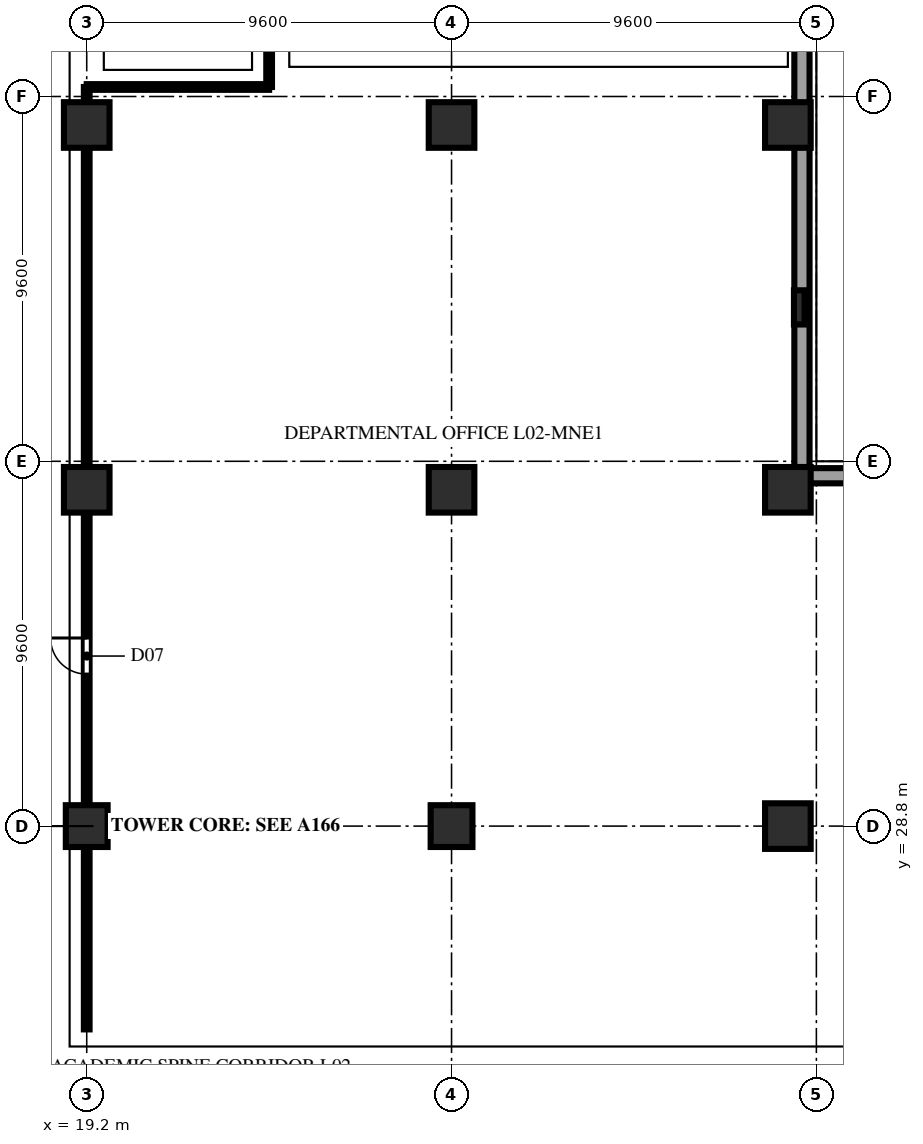
"""IFC4 building model, lengths in metres.
Left out: names, types, materials, properties, quantities, classifications, styles, units other than length and angle.
Written with IfcOpenShell. Run it as: python <this file> out.ifc"""

import sys

from ifc_helpers import new_model, si_unit, direction, frame, frame_2d, origin, origin_2d, place, context, subcontext, project, spatial, rectangle, extrude, element, fill, save


model = new_model("IFC4")
c1 = context("Model", 3, precision=1e-05, world=origin(), true_north=direction((0.0, 1.0)))
c2 = subcontext(c1, "Body", "Model", "MODEL_VIEW")
j1 = project(units=[si_unit("LENGTHUNIT", "METRE"), si_unit("PLANEANGLEUNIT", "RADIAN")], contexts=[c1])
p1 = place(None, origin())
s1 = spatial("IfcSite", under=j1, at=p1, CompositionType="ELEMENT")
p2 = place(p1, origin())
s2 = spatial("IfcBuilding", under=s1, at=p2, CompositionType="ELEMENT")
p3 = place(p2, frame((0.0, 0.0, 10.4)))
s3 = spatial("IfcBuildingStorey", under=s2, at=p3, CompositionType="ELEMENT", Elevation=10.4)
p4 = place(p3, frame((19.2, 28.8, 0.0), z_axis=(0.0, 0.0, 1.0), x_axis=(1.0, 0.0, 0.0)))
e1 = element("IfcColumn", 1, at=p4, inside=s3, PredefinedType="COLUMN", context=c2, shape_type="SweptSolid", body=[
    extrude(rectangle(XDim=1.1, YDim=1.1, at=origin_2d()), origin(), (0.0, 0.0, 1.0), 4.6),
])
for number, where, z_axis, x_axis in (
    (2, (19.2, 37.65, 0.0), (0.0, 0.0, 1.0), (1.0, 0.0, 0.0)),
    (3, (19.2, 47.25, 0.0), (0.0, 0.0, 1.0), (1.0, 0.0, 0.0)),
):
    element("IfcColumn", number, at=place(p3, frame(where, z_axis=z_axis, x_axis=x_axis)), inside=s3, PredefinedType="COLUMN", context=c2, shape_type="SweptSolid", body=[
        extrude(rectangle(XDim=1.2, YDim=1.2, at=origin_2d()), origin(), (0.0, 0.0, 1.0), 4.6),
    ])
p5 = place(p3, frame((28.8, 28.8, 0.0), z_axis=(0.0, 0.0, 1.0), x_axis=(1.0, 0.0, 0.0)))
e4 = element("IfcColumn", 4, at=p5, inside=s3, PredefinedType="COLUMN", context=c2, shape_type="SweptSolid", body=[
    extrude(rectangle(XDim=1.1, YDim=1.1, at=origin_2d()), origin(), (0.0, 0.0, 1.0), 4.6),
])
for number, where, z_axis, x_axis in (
    (5, (28.8, 37.65, 0.0), (0.0, 0.0, 1.0), (1.0, 0.0, 0.0)),
    (6, (28.8, 47.25, 0.0), (0.0, 0.0, 1.0), (1.0, 0.0, 0.0)),
    (7, (37.65, 28.8, 0.0), (0.0, 0.0, 1.0), (1.0, 0.0, 0.0)),
    (8, (37.65, 37.65, 0.0), (0.0, 0.0, 1.0), (1.0, 0.0, 0.0)),
    (9, (37.65, 47.25, 0.0), (0.0, 0.0, 1.0), (1.0, 0.0, 0.0)),
):
    element("IfcColumn", number, at=place(p3, frame(where, z_axis=z_axis, x_axis=x_axis)), inside=s3, PredefinedType="COLUMN", context=c2, shape_type="SweptSolid", body=[
        extrude(rectangle(XDim=1.2, YDim=1.2, at=origin_2d()), origin(), (0.0, 0.0, 1.0), 4.6),
    ])
p6 = place(p3, frame((37.95, 42.45, 0.0), z_axis=(0.0, 0.0, 1.0), x_axis=(0.0, 1.0, 0.0)))
e10 = element("IfcColumn", 10, at=p6, inside=s3, PredefinedType="PILASTER", context=c2, shape_type="SweptSolid", body=[
    extrude(rectangle(XDim=0.9, YDim=0.28, at=origin_2d()), origin(), (0.0, 0.0, 1.0), 4.6),
])
for number, where, z_axis, x_axis in (
    (11, (65.36, 38.02, 0.0), (0.0, 0.0, 1.0), (-1.0, 0.0, 0.0)),
    (12, (38.02, 37.68, 0.0), (0.0, 0.0, 1.0), (0.0, 1.0, 0.0)),
):
    element("IfcWall", number, at=place(p3, frame(where, z_axis=z_axis, x_axis=x_axis)), inside=s3, PredefinedType="SOLIDWALL", context=c2, shape_type="SweptSolid", body=[
        extrude(rectangle(XDim=27.68, YDim=0.4, at=frame_2d((13.84, 0.0))), origin(), (0.0, 0.0, 1.0), 4.26),
    ])
p7 = place(p3, frame((19.2, 23.45, 0.0), z_axis=(0.0, 0.0, 1.0), x_axis=(0.0, 1.0, 0.0)))
e13 = element("IfcWall", 13, at=p7, inside=s3, PredefinedType="PARTITIONING", context=c2, shape_type="SweptSolid", body=[
    extrude(rectangle(XDim=24.8, YDim=0.15, at=frame_2d((12.4, 0.0))), origin(), (0.0, 0.0, 1.0), 3.644),
])
p8 = place(p7, frame((9.35, 0.0, 0.0)))
e14 = element("IfcOpeningElement", 14, at=p8, cuts=e13, PredefinedType="OPENING", context=c2, shape_type="SweptSolid", body=[
    extrude(rectangle(XDim=0.95, YDim=2.15, at=frame_2d((0.475, 1.075))), frame((0.0, 0.087, 0.0), z_axis=(0.0, -1.0, 0.0), x_axis=(1.0, 0.0, 0.0)), (0.0, 0.0, 1.0), 0.174),
])
p9 = place(p3, frame((19.2, 48.25, 0.0), z_axis=(0.0, 0.0, 1.0), x_axis=(1.0, 0.0, 0.0)))
e15 = element("IfcWall", 15, at=p9, inside=s3, PredefinedType="PARTITIONING", context=c2, shape_type="SweptSolid", body=[
    extrude(rectangle(XDim=4.8, YDim=0.15, at=frame_2d((2.4, 0.0))), origin(), (0.0, 0.0, 1.0), 4.26),
])
p10 = place(p3, frame((24.0, 48.25, 0.0), z_axis=(0.0, 0.0, 1.0), x_axis=(0.0, 1.0, 0.0)))
e16 = element("IfcWall", 16, at=p10, inside=s3, PredefinedType="PARTITIONING", context=c2, shape_type="SweptSolid", body=[
    extrude(rectangle(XDim=8.438, YDim=0.15, at=frame_2d((4.219, 0.0))), origin(), (0.0, 0.0, 1.0), 3.716),
])
p11 = place(p10, frame((3.4, 0.0, 0.0)))
e17 = element("IfcOpeningElement", 17, at=p11, cuts=e16, PredefinedType="OPENING", context=c2, shape_type="SweptSolid", body=[
    extrude(rectangle(XDim=1.0, YDim=2.2, at=frame_2d((0.5, 1.1))), frame((0.0, 0.087, 0.0), z_axis=(0.0, -1.0, 0.0), x_axis=(1.0, 0.0, 0.0)), (0.0, 0.0, 1.0), 0.174),
])
p12 = place(p8, origin())
e18 = element("IfcDoor", 18, at=p12, inside=s3, OperationType="SINGLE_SWING_RIGHT", PredefinedType="DOOR", context=c2, shape_type="SweptSolid", body=[
    extrude(rectangle(XDim=0.95, YDim=2.15, at=frame_2d((0.475, 1.075))), frame((0.0, 0.025, 0.0), z_axis=(0.0, -1.0, 0.0), x_axis=(1.0, 0.0, 0.0)), (0.0, 0.0, 1.0), 0.05),
])
fill(e14, e18)
save(model, sys.argv[1])
